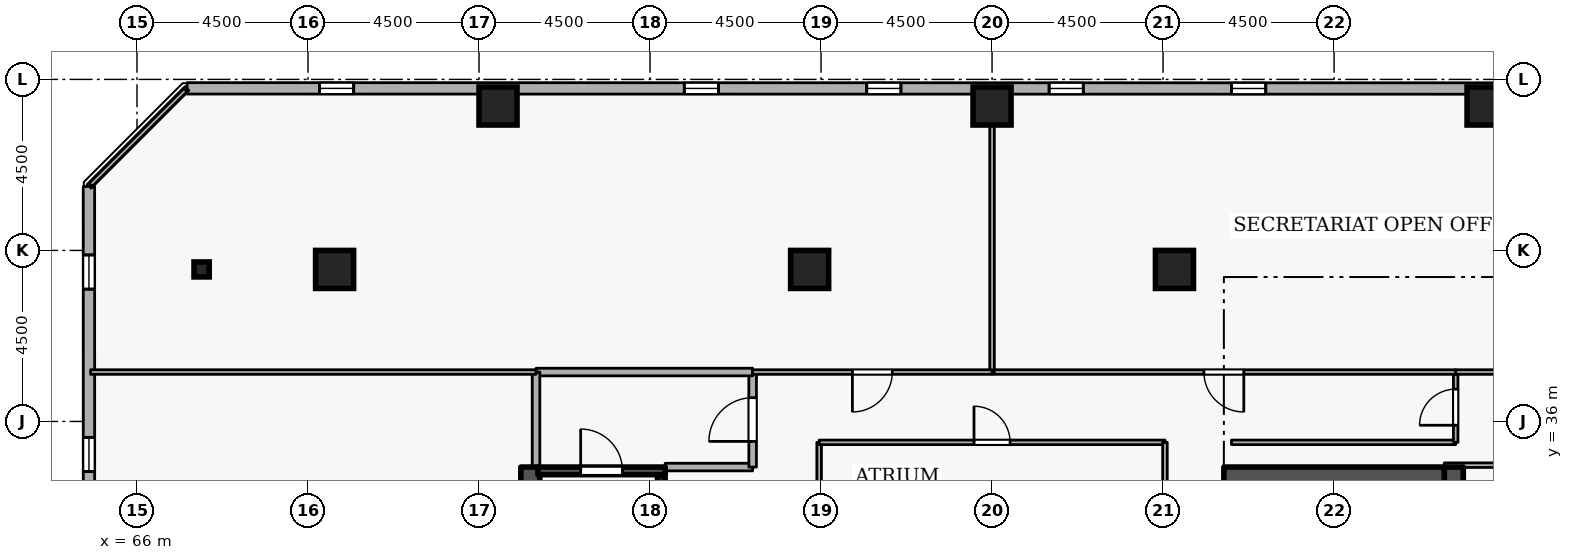
"""IFC4 building model, lengths in metres.
Left out: names, types, materials, properties, quantities, classifications, styles, units other than length and angle.
Written with IfcOpenShell. Run it as: python <this file> out.ifc"""

import sys

from ifc_helpers import new_model, si_unit, direction, frame, frame_2d, origin, origin_2d, place, context, subcontext, project, spatial, rectangle, i_section, extrude, element, fill, save


model = new_model("IFC4")
c1 = context("Model", 3, precision=1e-05, world=origin(), true_north=direction((0.0, 1.0)))
c2 = subcontext(c1, "Body", "Model", "MODEL_VIEW")
j1 = project(units=[si_unit("LENGTHUNIT", "METRE"), si_unit("PLANEANGLEUNIT", "RADIAN")], contexts=[c1])
p1 = place(None, origin())
s1 = spatial("IfcSite", under=j1, at=p1, CompositionType="ELEMENT")
p2 = place(p1, origin())
s2 = spatial("IfcBuilding", under=s1, at=p2, CompositionType="ELEMENT")
p3 = place(p2, frame((0.0, 0.0, 203.7)))
s3 = spatial("IfcBuildingStorey", under=s2, at=p3, CompositionType="ELEMENT", Elevation=203.7)
p4 = place(p3, frame((100.65, 19.2, 0.0), z_axis=(0.0, 0.0, 1.0), x_axis=(0.0, 1.0, 0.0)))
e1 = element("IfcWall", 1, at=p4, inside=s3, PredefinedType="SHEAR", context=c2, shape_type="SweptSolid", body=[
    extrude(rectangle(XDim=15.6, YDim=0.5, at=frame_2d((7.8, 0.0))), origin(), (0.0, 0.0, 1.0), 3.6),
])
p5 = place(p3, frame((94.6, 34.55, 0.0), z_axis=(0.0, 0.0, 1.0), x_axis=(1.0, 0.0, 0.0)))
e2 = element("IfcWall", 2, at=p5, inside=s3, PredefinedType="SHEAR", context=c2, shape_type="SweptSolid", body=[
    extrude(rectangle(XDim=5.8, YDim=0.5, at=frame_2d((2.9, 0.0))), origin(), (0.0, 0.0, 1.0), 3.6),
])
p6 = place(p3, frame((76.35, 19.2, 0.0), z_axis=(0.0, 0.0, 1.0), x_axis=(0.0, 1.0, 0.0)))
e3 = element("IfcWall", 3, at=p6, inside=s3, PredefinedType="SHEAR", context=c2, shape_type="SweptSolid", body=[
    extrude(rectangle(XDim=15.6, YDim=0.5, at=frame_2d((7.8, 0.0))), origin(), (0.0, 0.0, 1.0), 3.6),
])
for number, where, z_axis, x_axis in (
    (4, (101.5, 44.3, 0.0), (0.0, 0.0, 1.0), (1.0, 0.0, 0.0)),
    (5, (88.5, 44.3, 0.0), (0.0, 0.0, 1.0), (1.0, 0.0, 0.0)),
    (6, (75.5, 44.3, 0.0), (0.0, 0.0, 1.0), (1.0, 0.0, 0.0)),
    (7, (71.2, 40.0, 0.0), (0.0, 0.0, 1.0), (1.0, 0.0, 0.0)),
    (8, (93.3, 40.0, 0.0), (0.0, 0.0, 1.0), (1.0, 0.0, 0.0)),
    (9, (83.7, 40.0, 0.0), (0.0, 0.0, 1.0), (1.0, 0.0, 0.0)),
):
    element("IfcColumn", number, at=place(p3, frame(where, z_axis=z_axis, x_axis=x_axis)), inside=s3, PredefinedType="COLUMN", context=c2, shape_type="SweptSolid", body=[
        extrude(rectangle(XDim=1.0, YDim=1.0, at=origin_2d()), origin(), (0.0, 0.0, 1.0), 3.6),
    ])
p7 = place(p3, frame((67.7, 40.0, 0.0), z_axis=(0.0, 0.0, 1.0), x_axis=(1.0, 0.0, 0.0)))
e10 = element("IfcColumn", 10, at=p7, inside=s3, PredefinedType="COLUMN", context=c2, shape_type="SweptSolid", body=[
    extrude(i_section(OverallWidth=0.399, OverallDepth=0.394, WebThickness=0.023, FlangeThickness=0.037, FilletRadius=0.015, at=origin_2d()), origin(), (0.0, 0.0, 1.0), 3.6),
])
p8 = place(p3, frame((102.302, 44.76, 0.0), z_axis=(0.0, 0.0, 1.0), x_axis=(-0.999999991209, 0.000132597301, 0.0)))
e11 = element("IfcWall", 11, at=p8, inside=s3, PredefinedType="STANDARD", context=c2, shape_type="SweptSolid", body=[
    extrude(rectangle(XDim=34.983, YDim=0.3, at=frame_2d((17.492, 0.0))), origin(), (0.0, 0.0, 1.0), 2.7),
])
p9 = place(p8, frame((6.6, 0.0, 0.72)))
e12 = element("IfcOpeningElement", 12, at=p9, cuts=e11, PredefinedType="OPENING", context=c2, shape_type="SweptSolid", body=[
    extrude(rectangle(XDim=0.9, YDim=1.75, at=frame_2d((0.45, 0.875))), frame((0.0, 0.16, 0.0), z_axis=(0.0, -1.0, 0.0), x_axis=(1.0, 0.0, 0.0)), (0.0, 0.0, 1.0), 0.32),
])
p10 = place(p8, frame((11.4, 0.0, 0.72)))
e13 = element("IfcOpeningElement", 13, at=p10, cuts=e11, PredefinedType="OPENING", context=c2, shape_type="SweptSolid", body=[
    extrude(rectangle(XDim=0.9, YDim=1.75, at=frame_2d((0.45, 0.875))), frame((0.0, 0.16, 0.0), z_axis=(0.0, -1.0, 0.0), x_axis=(1.0, 0.0, 0.0)), (0.0, 0.0, 1.0), 0.32),
])
p11 = place(p8, frame((16.2, 0.0, 0.72)))
e14 = element("IfcOpeningElement", 14, at=p11, cuts=e11, PredefinedType="OPENING", context=c2, shape_type="SweptSolid", body=[
    extrude(rectangle(XDim=0.9, YDim=1.75, at=frame_2d((0.45, 0.875))), frame((0.0, 0.16, 0.0), z_axis=(0.0, -1.0, 0.0), x_axis=(1.0, 0.0, 0.0)), (0.0, 0.0, 1.0), 0.32),
])
p12 = place(p8, frame((21.0, 0.0, 0.72)))
e15 = element("IfcOpeningElement", 15, at=p12, cuts=e11, PredefinedType="OPENING", context=c2, shape_type="SweptSolid", body=[
    extrude(rectangle(XDim=0.9, YDim=1.75, at=frame_2d((0.45, 0.875))), frame((0.0, 0.16, 0.0), z_axis=(0.0, -1.0, 0.0), x_axis=(1.0, 0.0, 0.0)), (0.0, 0.0, 1.0), 0.32),
])
p13 = place(p8, frame((30.6, 0.0, 0.72)))
e16 = element("IfcOpeningElement", 16, at=p13, cuts=e11, PredefinedType="OPENING", context=c2, shape_type="SweptSolid", body=[
    extrude(rectangle(XDim=0.9, YDim=1.75, at=frame_2d((0.45, 0.875))), frame((0.0, 0.16, 0.0), z_axis=(0.0, -1.0, 0.0), x_axis=(1.0, 0.0, 0.0)), (0.0, 0.0, 1.0), 0.32),
])
p14 = place(p3, frame((64.735, 42.181, 0.0), z_axis=(0.0, 0.0, 1.0), x_axis=(0.000132597301, -0.999999991209, 0.0)))
e17 = element("IfcWall", 17, at=p14, inside=s3, PredefinedType="STANDARD", context=c2, shape_type="SweptSolid", body=[
    extrude(rectangle(XDim=34.983, YDim=0.3, at=frame_2d((17.492, 0.0))), origin(), (0.0, 0.0, 1.0), 2.7),
])
p15 = place(p14, frame((1.8, 0.0, 0.72)))
e18 = element("IfcOpeningElement", 18, at=p15, cuts=e17, PredefinedType="OPENING", context=c2, shape_type="SweptSolid", body=[
    extrude(rectangle(XDim=0.9, YDim=1.75, at=frame_2d((0.45, 0.875))), frame((0.0, 0.16, 0.0), z_axis=(0.0, -1.0, 0.0), x_axis=(1.0, 0.0, 0.0)), (0.0, 0.0, 1.0), 0.32),
])
p16 = place(p14, frame((6.6, 0.0, 0.72)))
e19 = element("IfcOpeningElement", 19, at=p16, cuts=e17, PredefinedType="OPENING", context=c2, shape_type="SweptSolid", body=[
    extrude(rectangle(XDim=0.9, YDim=1.75, at=frame_2d((0.45, 0.875))), frame((0.0, 0.16, 0.0), z_axis=(0.0, -1.0, 0.0), x_axis=(1.0, 0.0, 0.0)), (0.0, 0.0, 1.0), 0.32),
])
p17 = place(p14, frame((11.4, 0.0, 0.72)))
e20 = element("IfcOpeningElement", 20, at=p17, cuts=e17, PredefinedType="OPENING", context=c2, shape_type="SweptSolid", body=[
    extrude(rectangle(XDim=0.9, YDim=1.75, at=frame_2d((0.45, 0.875))), frame((0.0, 0.16, 0.0), z_axis=(0.0, -1.0, 0.0), x_axis=(1.0, 0.0, 0.0)), (0.0, 0.0, 1.0), 0.32),
])
p18 = place(p14, frame((16.2, 0.0, 0.72)))
e21 = element("IfcOpeningElement", 21, at=p18, cuts=e17, PredefinedType="OPENING", context=c2, shape_type="SweptSolid", body=[
    extrude(rectangle(XDim=0.9, YDim=1.75, at=frame_2d((0.45, 0.875))), frame((0.0, 0.16, 0.0), z_axis=(0.0, -1.0, 0.0), x_axis=(1.0, 0.0, 0.0)), (0.0, 0.0, 1.0), 0.32),
])
p19 = place(p14, frame((21.0, 0.0, 0.72)))
e22 = element("IfcOpeningElement", 22, at=p19, cuts=e17, PredefinedType="OPENING", context=c2, shape_type="SweptSolid", body=[
    extrude(rectangle(XDim=0.9, YDim=1.75, at=frame_2d((0.45, 0.875))), frame((0.0, 0.16, 0.0), z_axis=(0.0, -1.0, 0.0), x_axis=(1.0, 0.0, 0.0)), (0.0, 0.0, 1.0), 0.32),
])
p20 = place(p14, frame((25.8, 0.0, 0.72)))
e23 = element("IfcOpeningElement", 23, at=p20, cuts=e17, PredefinedType="OPENING", context=c2, shape_type="SweptSolid", body=[
    extrude(rectangle(XDim=0.9, YDim=1.75, at=frame_2d((0.45, 0.875))), frame((0.0, 0.16, 0.0), z_axis=(0.0, -1.0, 0.0), x_axis=(1.0, 0.0, 0.0)), (0.0, 0.0, 1.0), 0.32),
])
p21 = place(p14, frame((30.6, 0.0, 0.72)))
e24 = element("IfcOpeningElement", 24, at=p21, cuts=e17, PredefinedType="OPENING", context=c2, shape_type="SweptSolid", body=[
    extrude(rectangle(XDim=0.9, YDim=1.75, at=frame_2d((0.45, 0.875))), frame((0.0, 0.16, 0.0), z_axis=(0.0, -1.0, 0.0), x_axis=(1.0, 0.0, 0.0)), (0.0, 0.0, 1.0), 0.32),
])
p22 = place(p3, frame((76.55, 34.7, 0.0), z_axis=(0.0, 0.0, 1.0), x_axis=(1.0, 0.0, 0.0)))
e25 = element("IfcWall", 25, at=p22, inside=s3, PredefinedType="SHEAR", context=c2, shape_type="SweptSolid", body=[
    extrude(rectangle(XDim=3.35, YDim=0.2, at=frame_2d((1.675, 0.0))), origin(), (0.0, 0.0, 1.0), 3.6),
])
p23 = place(p22, frame((1.125, 0.0, 0.0)))
e26 = element("IfcOpeningElement", 26, at=p23, cuts=e25, PredefinedType="OPENING", context=c2, shape_type="SweptSolid", body=[
    extrude(rectangle(XDim=1.1, YDim=2.1, at=frame_2d((0.55, 1.05))), frame((0.0, 0.11, 0.0), z_axis=(0.0, -1.0, 0.0), x_axis=(1.0, 0.0, 0.0)), (0.0, 0.0, 1.0), 0.22),
])
p24 = place(p3, frame((79.797, 27.45, 0.0), z_axis=(0.0, 0.0, 1.0), x_axis=(0.0, 1.0, 0.0)))
e27 = element("IfcWall", 27, at=p24, inside=s3, PredefinedType="SHEAR", context=c2, shape_type="SweptSolid", body=[
    extrude(rectangle(XDim=7.1, YDim=0.2, at=frame_2d((3.55, 0.0))), origin(), (0.0, 0.0, 1.0), 3.6),
])
p25 = place(p3, frame((79.9, 34.8, 0.0), z_axis=(0.0, 0.0, 1.0), x_axis=(1.0, 0.0, 0.0)))
e28 = element("IfcWall", 28, at=p25, inside=s3, PredefinedType="STANDARD", context=c2, shape_type="SweptSolid", body=[
    extrude(rectangle(XDim=2.3, YDim=0.2, at=frame_2d((1.15, 0.0))), origin(), (0.0, 0.0, 1.0), 2.545),
])
p26 = place(p3, frame((82.2, 34.8, 0.0), z_axis=(0.0, 0.0, 1.0), x_axis=(0.0, 1.0, 0.0)))
e29 = element("IfcWall", 29, at=p26, inside=s3, PredefinedType="STANDARD", context=c2, shape_type="SweptSolid", body=[
    extrude(rectangle(XDim=2.5, YDim=0.2, at=frame_2d((1.25, 0.0))), origin(), (0.0, 0.0, 1.0), 3.34),
])
p27 = place(p26, frame((0.675, 0.0, 0.0)))
e30 = element("IfcOpeningElement", 30, at=p27, cuts=e29, PredefinedType="OPENING", context=c2, shape_type="SweptSolid", body=[
    extrude(rectangle(XDim=1.15, YDim=2.1, at=frame_2d((0.575, 1.05))), frame((0.0, 0.11, 0.0), z_axis=(0.0, -1.0, 0.0), x_axis=(1.0, 0.0, 0.0)), (0.0, 0.0, 1.0), 0.22),
])
p28 = place(p3, frame((82.2, 37.3, 0.0), z_axis=(0.0, 0.0, 1.0), x_axis=(-1.0, 0.0, 0.0)))
e31 = element("IfcWall", 31, at=p28, inside=s3, PredefinedType="STANDARD", context=c2, shape_type="SweptSolid", body=[
    extrude(rectangle(XDim=5.7, YDim=0.2, at=frame_2d((2.85, 0.0))), origin(), (0.0, 0.0, 1.0), 3.34),
])
p29 = place(p3, frame((76.5, 37.3, 0.0), z_axis=(0.0, 0.0, 1.0), x_axis=(0.0, -1.0, 0.0)))
e32 = element("IfcWall", 32, at=p29, inside=s3, PredefinedType="STANDARD", context=c2, shape_type="SweptSolid", body=[
    extrude(rectangle(XDim=2.5, YDim=0.2, at=frame_2d((1.25, 0.0))), origin(), (0.0, 0.0, 1.0), 3.34),
])
p30 = place(p3, frame((94.8, 35.45, 0.0), z_axis=(0.0, 0.0, 1.0), x_axis=(1.0, 0.0, 0.0)))
e33 = element("IfcWall", 33, at=p30, inside=s3, PredefinedType="PARTITIONING", context=c2, shape_type="SweptSolid", body=[
    extrude(rectangle(XDim=5.9, YDim=0.12, at=frame_2d((2.95, 0.0))), origin(), (0.0, 0.0, 1.0), 3.34),
])
p31 = place(p3, frame((100.7, 35.45, 0.0), z_axis=(0.0, 0.0, 1.0), x_axis=(0.0, 1.0, 0.0)))
e34 = element("IfcWall", 34, at=p31, inside=s3, PredefinedType="PARTITIONING", context=c2, shape_type="SweptSolid", body=[
    extrude(rectangle(XDim=1.85, YDim=0.12, at=frame_2d((0.925, 0.0))), origin(), (0.0, 0.0, 1.0), 3.34),
])
p32 = place(p31, frame((0.45, 0.0, 0.0)))
e35 = element("IfcOpeningElement", 35, at=p32, cuts=e34, PredefinedType="OPENING", context=c2, shape_type="SweptSolid", body=[
    extrude(rectangle(XDim=0.95, YDim=2.1, at=frame_2d((0.475, 1.05))), frame((0.0, 0.07, 0.0), z_axis=(0.0, -1.0, 0.0), x_axis=(1.0, 0.0, 0.0)), (0.0, 0.0, 1.0), 0.14),
])
p33 = place(p3, frame((100.7, 37.3, 0.0), z_axis=(0.0, 0.0, 1.0), x_axis=(1.0, 0.0, 0.0)))
e36 = element("IfcWall", 36, at=p33, inside=s3, PredefinedType="PARTITIONING", context=c2, shape_type="SweptSolid", body=[
    extrude(rectangle(XDim=5.52, YDim=0.12, at=frame_2d((2.76, 0.0))), origin(), (0.0, 0.0, 1.0), 3.34),
])
p34 = place(p3, frame((106.22, 34.85, 0.0), z_axis=(0.0, 0.0, 1.0), x_axis=(-1.0, 0.0, 0.0)))
e37 = element("IfcWall", 37, at=p34, inside=s3, PredefinedType="PARTITIONING", context=c2, shape_type="SweptSolid", body=[
    extrude(rectangle(XDim=5.82, YDim=0.12, at=frame_2d((2.91, 0.0))), origin(), (0.0, 0.0, 1.0), 2.545),
])
p35 = place(p3, frame((100.7, 37.3, 0.0), z_axis=(0.0, 0.0, 1.0), x_axis=(-1.0, 0.0, 0.0)))
e38 = element("IfcWall", 38, at=p35, inside=s3, PredefinedType="PARTITIONING", context=c2, shape_type="SweptSolid", body=[
    extrude(rectangle(XDim=12.2, YDim=0.12, at=frame_2d((6.1, 0.0))), origin(), (0.0, 0.0, 1.0), 3.34),
])
p36 = place(p35, frame((5.575, 0.0, 0.0)))
e39 = element("IfcOpeningElement", 39, at=p36, cuts=e38, PredefinedType="OPENING", context=c2, shape_type="SweptSolid", body=[
    extrude(rectangle(XDim=1.05, YDim=2.1, at=frame_2d((0.525, 1.05))), frame((0.0, 0.07, 0.0), z_axis=(0.0, -1.0, 0.0), x_axis=(1.0, 0.0, 0.0)), (0.0, 0.0, 1.0), 0.14),
])
p37 = place(p3, frame((88.5, 37.3, 0.0), z_axis=(0.0, 0.0, 1.0), x_axis=(0.0, 1.0, 0.0)))
e40 = element("IfcWall", 40, at=p37, inside=s3, PredefinedType="PARTITIONING", context=c2, shape_type="SweptSolid", body=[
    extrude(rectangle(XDim=7.42, YDim=0.12, at=frame_2d((3.71, 0.0))), origin(), (0.0, 0.0, 1.0), 2.932),
])
p38 = place(p3, frame((76.5, 37.3, 0.0), z_axis=(0.0, 0.0, 1.0), x_axis=(-1.0, 0.0, 0.0)))
e41 = element("IfcWall", 41, at=p38, inside=s3, PredefinedType="PARTITIONING", context=c2, shape_type="SweptSolid", body=[
    extrude(rectangle(XDim=11.72, YDim=0.12, at=frame_2d((5.86, 0.0))), origin(), (0.0, 0.0, 1.0), 3.34),
])
p39 = place(p3, frame((64.78, 42.225, 0.0), z_axis=(0.0, 0.0, 1.0), x_axis=(0.707106781187, 0.707106781187, 0.0)))
e42 = element("IfcWall", 42, at=p39, inside=s3, PredefinedType="PARTITIONING", context=c2, shape_type="SweptSolid", body=[
    extrude(rectangle(XDim=3.528, YDim=0.12, at=frame_2d((1.764, 0.0))), origin(), (0.0, 0.0, 1.0), 3.34),
])
p40 = place(p3, frame((88.5, 37.3, 0.0), z_axis=(0.0, 0.0, 1.0), x_axis=(-1.0, 0.0, 0.0)))
e43 = element("IfcWall", 43, at=p40, inside=s3, PredefinedType="PARTITIONING", context=c2, shape_type="SweptSolid", body=[
    extrude(rectangle(XDim=6.3, YDim=0.12, at=frame_2d((3.15, 0.0))), origin(), (0.0, 0.0, 1.0), 3.34),
])
p41 = place(p40, frame((2.625, 0.0, 0.0)))
e44 = element("IfcOpeningElement", 44, at=p41, cuts=e43, PredefinedType="OPENING", context=c2, shape_type="SweptSolid", body=[
    extrude(rectangle(XDim=1.05, YDim=2.1, at=frame_2d((0.525, 1.05))), frame((0.0, 0.07, 0.0), z_axis=(0.0, -1.0, 0.0), x_axis=(1.0, 0.0, 0.0)), (0.0, 0.0, 1.0), 0.14),
])
p42 = place(p3, frame((83.95, 32.2, 0.0), z_axis=(0.0, 0.0, 1.0), x_axis=(0.0, 1.0, 0.0)))
e45 = element("IfcWall", 45, at=p42, inside=s3, PredefinedType="PARTITIONING", context=c2, shape_type="SweptSolid", body=[
    extrude(rectangle(XDim=3.25, YDim=0.12, at=frame_2d((1.625, 0.0))), origin(), (0.0, 0.0, 1.0), 3.34),
])
p43 = place(p3, frame((83.95, 35.45, 0.0), z_axis=(0.0, 0.0, 1.0), x_axis=(1.0, 0.0, 0.0)))
e46 = element("IfcWall", 46, at=p43, inside=s3, PredefinedType="PARTITIONING", context=c2, shape_type="SweptSolid", body=[
    extrude(rectangle(XDim=9.1, YDim=0.12, at=frame_2d((4.55, 0.0))), origin(), (0.0, 0.0, 1.0), 3.34),
])
p44 = place(p43, frame((4.075, 0.0, 0.0)))
e47 = element("IfcOpeningElement", 47, at=p44, cuts=e46, PredefinedType="OPENING", context=c2, shape_type="SweptSolid", body=[
    extrude(rectangle(XDim=0.95, YDim=2.1, at=frame_2d((0.475, 1.05))), frame((0.0, 0.07, 0.0), z_axis=(0.0, -1.0, 0.0), x_axis=(1.0, 0.0, 0.0)), (0.0, 0.0, 1.0), 0.14),
])
p45 = place(p3, frame((93.05, 35.45, 0.0), z_axis=(0.0, 0.0, 1.0), x_axis=(0.0, -1.0, 0.0)))
e48 = element("IfcWall", 48, at=p45, inside=s3, PredefinedType="PARTITIONING", context=c2, shape_type="SweptSolid", body=[
    extrude(rectangle(XDim=3.25, YDim=0.12, at=frame_2d((1.625, 0.0))), origin(), (0.0, 0.0, 1.0), 3.34),
])
p46 = place(p9, origin())
e49 = element("IfcWindow", 49, at=p46, inside=s3, PartitioningType="SINGLE_PANEL", PredefinedType="WINDOW", context=c2, shape_type="SweptSolid", body=[
    extrude(rectangle(XDim=0.9, YDim=1.75, at=frame_2d((0.45, 0.875))), frame((0.0, 0.03, 0.0), z_axis=(0.0, -1.0, 0.0), x_axis=(1.0, 0.0, 0.0)), (0.0, 0.0, 1.0), 0.06),
])
fill(e12, e49)
p47 = place(p10, origin())
e50 = element("IfcWindow", 50, at=p47, inside=s3, PartitioningType="SINGLE_PANEL", PredefinedType="WINDOW", context=c2, shape_type="SweptSolid", body=[
    extrude(rectangle(XDim=0.9, YDim=1.75, at=frame_2d((0.45, 0.875))), frame((0.0, 0.03, 0.0), z_axis=(0.0, -1.0, 0.0), x_axis=(1.0, 0.0, 0.0)), (0.0, 0.0, 1.0), 0.06),
])
fill(e13, e50)
p48 = place(p11, origin())
e51 = element("IfcWindow", 51, at=p48, inside=s3, PartitioningType="SINGLE_PANEL", PredefinedType="WINDOW", context=c2, shape_type="SweptSolid", body=[
    extrude(rectangle(XDim=0.9, YDim=1.75, at=frame_2d((0.45, 0.875))), frame((0.0, 0.03, 0.0), z_axis=(0.0, -1.0, 0.0), x_axis=(1.0, 0.0, 0.0)), (0.0, 0.0, 1.0), 0.06),
])
fill(e14, e51)
p49 = place(p12, origin())
e52 = element("IfcWindow", 52, at=p49, inside=s3, PartitioningType="SINGLE_PANEL", PredefinedType="WINDOW", context=c2, shape_type="SweptSolid", body=[
    extrude(rectangle(XDim=0.9, YDim=1.75, at=frame_2d((0.45, 0.875))), frame((0.0, 0.03, 0.0), z_axis=(0.0, -1.0, 0.0), x_axis=(1.0, 0.0, 0.0)), (0.0, 0.0, 1.0), 0.06),
])
fill(e15, e52)
p50 = place(p13, origin())
e53 = element("IfcWindow", 53, at=p50, inside=s3, PartitioningType="SINGLE_PANEL", PredefinedType="WINDOW", context=c2, shape_type="SweptSolid", body=[
    extrude(rectangle(XDim=0.9, YDim=1.75, at=frame_2d((0.45, 0.875))), frame((0.0, 0.03, 0.0), z_axis=(0.0, -1.0, 0.0), x_axis=(1.0, 0.0, 0.0)), (0.0, 0.0, 1.0), 0.06),
])
fill(e16, e53)
p51 = place(p15, origin())
e54 = element("IfcWindow", 54, at=p51, inside=s3, PartitioningType="SINGLE_PANEL", PredefinedType="WINDOW", context=c2, shape_type="SweptSolid", body=[
    extrude(rectangle(XDim=0.9, YDim=1.75, at=frame_2d((0.45, 0.875))), frame((0.0, 0.03, 0.0), z_axis=(0.0, -1.0, 0.0), x_axis=(1.0, 0.0, 0.0)), (0.0, 0.0, 1.0), 0.06),
])
fill(e18, e54)
p52 = place(p16, origin())
e55 = element("IfcWindow", 55, at=p52, inside=s3, PartitioningType="SINGLE_PANEL", PredefinedType="WINDOW", context=c2, shape_type="SweptSolid", body=[
    extrude(rectangle(XDim=0.9, YDim=1.75, at=frame_2d((0.45, 0.875))), frame((0.0, 0.03, 0.0), z_axis=(0.0, -1.0, 0.0), x_axis=(1.0, 0.0, 0.0)), (0.0, 0.0, 1.0), 0.06),
])
fill(e19, e55)
p53 = place(p23, origin())
e56 = element("IfcDoor", 56, at=p53, inside=s3, OperationType="SINGLE_SWING_LEFT", PredefinedType="DOOR", context=c2, shape_type="SweptSolid", body=[
    extrude(rectangle(XDim=1.1, YDim=2.1, at=frame_2d((0.55, 1.05))), frame((0.0, 0.025, 0.0), z_axis=(0.0, -1.0, 0.0), x_axis=(1.0, 0.0, 0.0)), (0.0, 0.0, 1.0), 0.05),
])
fill(e26, e56)
p54 = place(p27, origin())
e57 = element("IfcDoor", 57, at=p54, inside=s3, OperationType="SINGLE_SWING_LEFT", PredefinedType="DOOR", context=c2, shape_type="SweptSolid", body=[
    extrude(rectangle(XDim=1.15, YDim=2.1, at=frame_2d((0.575, 1.05))), frame((0.0, 0.025, 0.0), z_axis=(0.0, -1.0, 0.0), x_axis=(1.0, 0.0, 0.0)), (0.0, 0.0, 1.0), 0.05),
])
fill(e30, e57)
p55 = place(p32, origin())
e58 = element("IfcDoor", 58, at=p55, inside=s3, OperationType="SINGLE_SWING_LEFT", PredefinedType="DOOR", context=c2, shape_type="SweptSolid", body=[
    extrude(rectangle(XDim=0.95, YDim=2.1, at=frame_2d((0.475, 1.05))), frame((0.0, 0.025, 0.0), z_axis=(0.0, -1.0, 0.0), x_axis=(1.0, 0.0, 0.0)), (0.0, 0.0, 1.0), 0.05),
])
fill(e35, e58)
p56 = place(p36, origin())
e59 = element("IfcDoor", 59, at=p56, inside=s3, OperationType="SINGLE_SWING_LEFT", PredefinedType="DOOR", context=c2, shape_type="SweptSolid", body=[
    extrude(rectangle(XDim=1.05, YDim=2.1, at=frame_2d((0.525, 1.05))), frame((0.0, 0.025, 0.0), z_axis=(0.0, -1.0, 0.0), x_axis=(1.0, 0.0, 0.0)), (0.0, 0.0, 1.0), 0.05),
])
fill(e39, e59)
p57 = place(p41, origin())
e60 = element("IfcDoor", 60, at=p57, inside=s3, OperationType="SINGLE_SWING_RIGHT", PredefinedType="DOOR", context=c2, shape_type="SweptSolid", body=[
    extrude(rectangle(XDim=1.05, YDim=2.1, at=frame_2d((0.525, 1.05))), frame((0.0, 0.025, 0.0), z_axis=(0.0, -1.0, 0.0), x_axis=(1.0, 0.0, 0.0)), (0.0, 0.0, 1.0), 0.05),
])
fill(e44, e60)
p58 = place(p44, origin())
e61 = element("IfcDoor", 61, at=p58, inside=s3, OperationType="SINGLE_SWING_LEFT", PredefinedType="DOOR", context=c2, shape_type="SweptSolid", body=[
    extrude(rectangle(XDim=0.95, YDim=2.1, at=frame_2d((0.475, 1.05))), frame((0.0, 0.025, 0.0), z_axis=(0.0, -1.0, 0.0), x_axis=(1.0, 0.0, 0.0)), (0.0, 0.0, 1.0), 0.05),
])
fill(e47, e61)
save(model, sys.argv[1])
